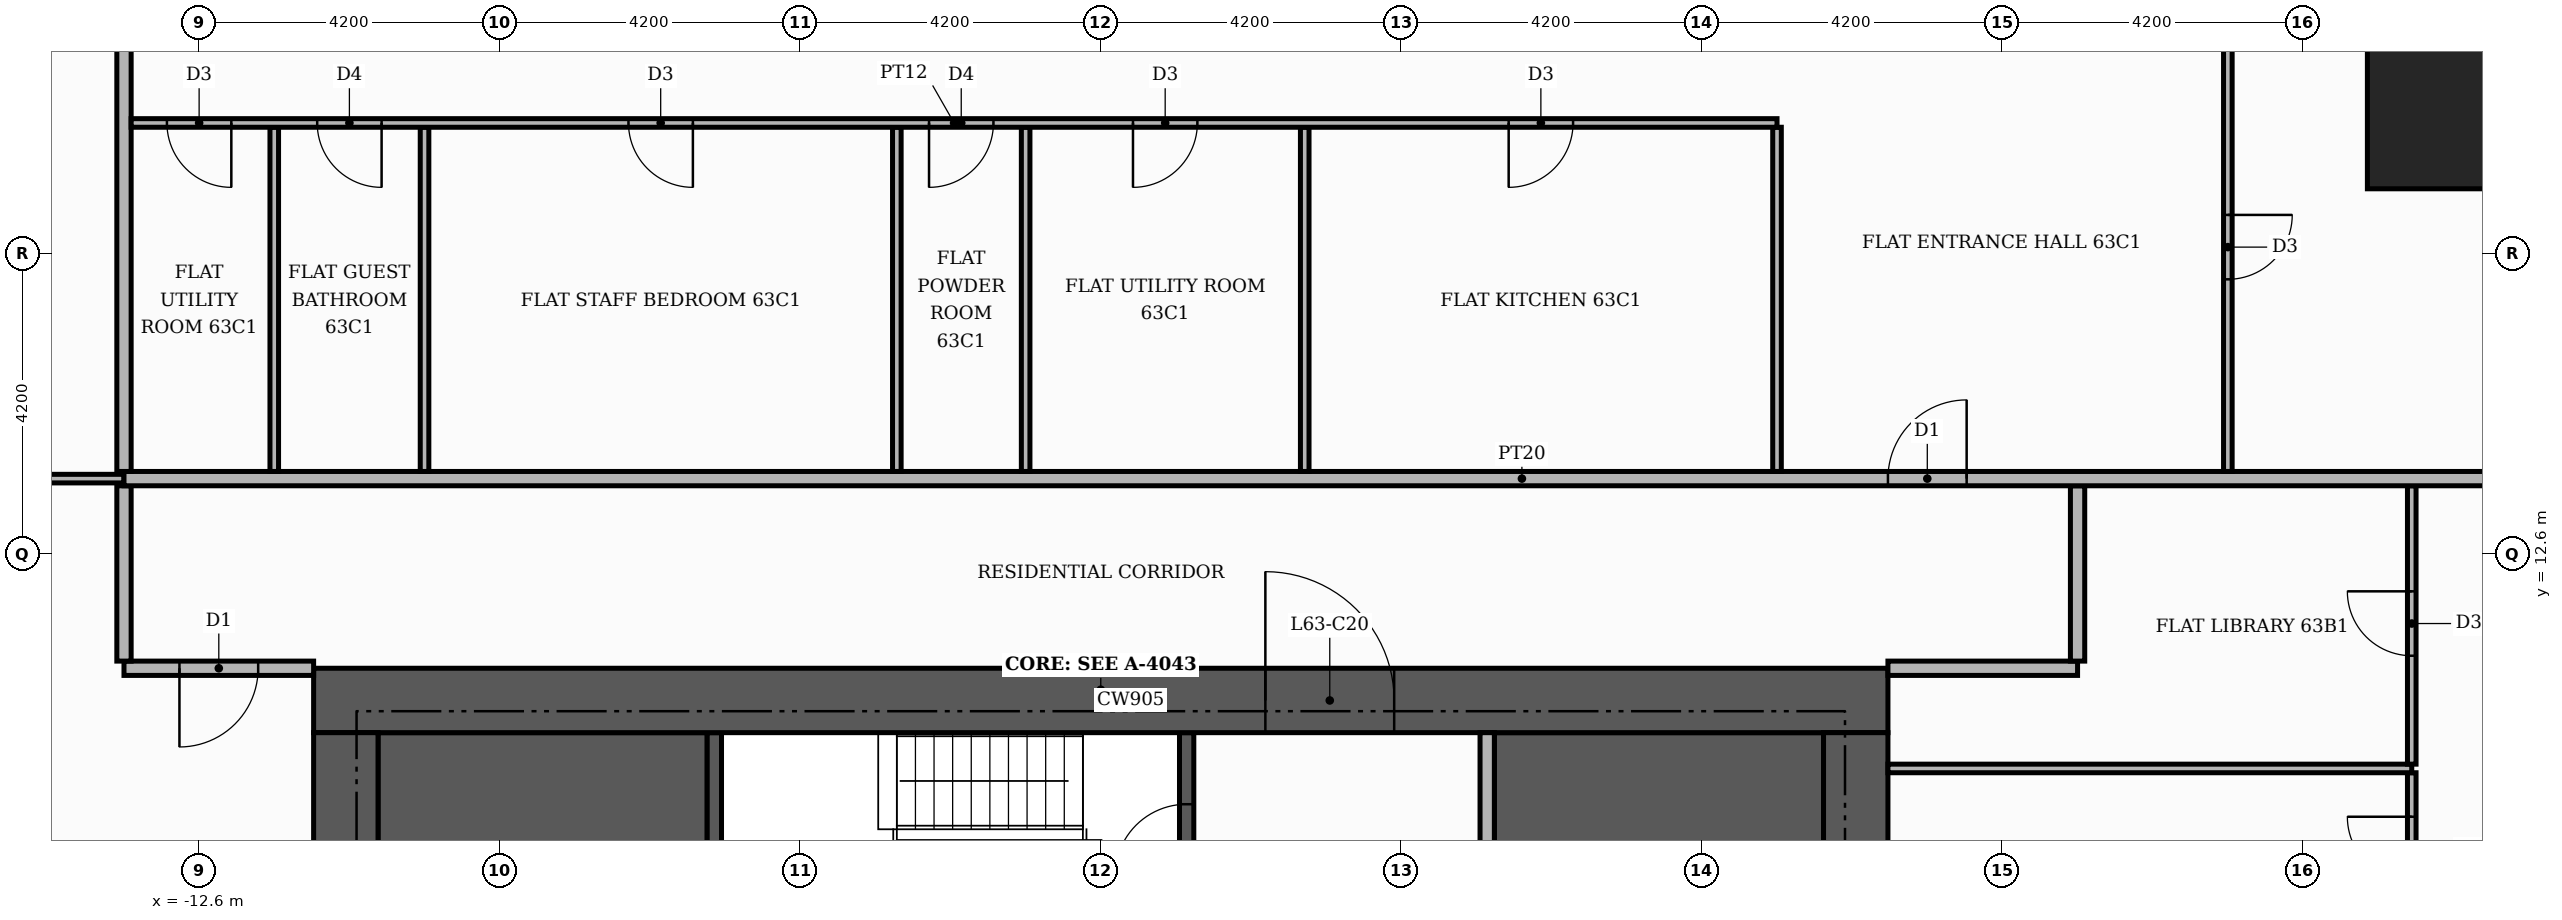
"""IFC4 building model, lengths in metres.
Left out: names, types, materials, properties, quantities, classifications, styles, units other than length and angle.
Written with IfcOpenShell. Run it as: python <this file> out.ifc"""

import sys

from ifc_helpers import new_model, si_unit, direction, frame, frame_2d, origin, origin_2d, place, context, subcontext, project, spatial, rectangle, extrude, element, fill, save


model = new_model("IFC4")
c1 = context("Model", 3, precision=1e-05, world=origin(), true_north=direction((0.0, 1.0)))
c2 = subcontext(c1, "Body", "Model", "MODEL_VIEW")
j1 = project(units=[si_unit("LENGTHUNIT", "METRE"), si_unit("PLANEANGLEUNIT", "RADIAN")], contexts=[c1])
p1 = place(None, origin())
s1 = spatial("IfcSite", under=j1, at=p1, CompositionType="ELEMENT")
p2 = place(p1, origin())
s2 = spatial("IfcBuilding", under=s1, at=p2, CompositionType="ELEMENT")
p3 = place(p2, frame((0.0, 0.0, 264.0)))
s3 = spatial("IfcBuildingStorey", under=s2, at=p3, CompositionType="ELEMENT", Elevation=264.0)
for number, where, z_axis, x_axis in (
    (1, (-10.1, 9.15, 0.0), (0.0, 0.0, 1.0), (1.0, 0.0, 0.0)),
    (2, (5.5, 9.15, 0.0), (0.0, 0.0, 1.0), (1.0, 0.0, 0.0)),
):
    element("IfcWall", number, at=place(p3, frame(where, z_axis=z_axis, x_axis=x_axis)), inside=s3, PredefinedType="SHEAR", context=c2, shape_type="SweptSolid", body=[
        extrude(rectangle(XDim=4.6, YDim=1.9, at=frame_2d((2.3, 0.0))), origin(), (0.0, 0.0, 1.0), 3.48),
    ])
p4 = place(p3, frame((-5.4, 7.25, 0.0), z_axis=(0.0, 0.0, 1.0), x_axis=(0.0, 1.0, 0.0)))
e3 = element("IfcWall", 3, at=p4, inside=s3, PredefinedType="SHEAR", context=c2, shape_type="SweptSolid", body=[
    extrude(rectangle(XDim=2.85, YDim=0.2, at=frame_2d((1.425, 0.0))), origin(), (0.0, 0.0, 1.0), 3.48),
])
p5 = place(p3, frame((1.2, 7.25, 0.0), z_axis=(0.0, 0.0, 1.0), x_axis=(0.0, 1.0, 0.0)))
e4 = element("IfcWall", 4, at=p5, inside=s3, PredefinedType="SHEAR", context=c2, shape_type="SweptSolid", body=[
    extrude(rectangle(XDim=2.85, YDim=0.2, at=frame_2d((1.425, 0.0))), origin(), (0.0, 0.0, 1.0), 3.48),
])
p6 = place(p5, frame((0.85, 0.0, 0.0)))
e5 = element("IfcOpeningElement", 5, at=p6, cuts=e4, PredefinedType="OPENING", context=c2, shape_type="SweptSolid", body=[
    extrude(rectangle(XDim=1.0, YDim=2.1, at=frame_2d((0.5, 1.05))), frame((0.0, 0.11, 0.0), z_axis=(0.0, -1.0, 0.0), x_axis=(1.0, 0.0, 0.0)), (0.0, 0.0, 1.0), 0.22),
])
p7 = place(p3, frame((-11.0, 10.55, 0.0), z_axis=(0.0, 0.0, 1.0), x_axis=(1.0, 0.0, 0.0)))
e6 = element("IfcWall", 6, at=p7, inside=s3, PredefinedType="SHEAR", context=c2, shape_type="SweptSolid", body=[
    extrude(rectangle(XDim=22.0, YDim=0.9, at=frame_2d((11.0, 0.0))), origin(), (0.0, 0.0, 1.0), 3.48),
])
p8 = place(p7, frame((13.3, 0.0, 0.0)))
e7 = element("IfcOpeningElement", 7, at=p8, cuts=e6, PredefinedType="OPENING", context=c2, shape_type="SweptSolid", body=[
    extrude(rectangle(XDim=1.8, YDim=2.2, at=frame_2d((0.9, 1.1))), frame((0.0, 0.46, 0.0), z_axis=(0.0, -1.0, 0.0), x_axis=(1.0, 0.0, 0.0)), (0.0, 0.0, 1.0), 0.92),
])
for number, where, z_axis, x_axis in (
    (8, (-10.55, -10.1, 0.0), (0.0, 0.0, 1.0), (0.0, 1.0, 0.0)),
    (9, (10.55, -10.1, 0.0), (0.0, 0.0, 1.0), (0.0, 1.0, 0.0)),
):
    element("IfcWall", number, at=place(p3, frame(where, z_axis=z_axis, x_axis=x_axis)), inside=s3, PredefinedType="SHEAR", context=c2, shape_type="SweptSolid", body=[
        extrude(rectangle(XDim=20.2, YDim=0.9, at=frame_2d((10.1, 0.0))), origin(), (0.0, 0.0, 1.0), 3.48),
    ])
p9 = place(p3, frame((18.8, 18.8, 0.0), z_axis=(0.0, 0.0, 1.0), x_axis=(1.0, 0.0, 0.0)))
e10 = element("IfcColumn", 10, at=p9, inside=s3, PredefinedType="COLUMN", context=c2, shape_type="SweptSolid", body=[
    extrude(rectangle(XDim=2.2, YDim=2.2, at=origin_2d()), origin(), (0.0, 0.0, 1.0), 3.9),
])
p10 = place(p3, frame((5.4, 5.5, 0.0), z_axis=(0.0, 0.0, 1.0), x_axis=(0.0, 1.0, 0.0)))
e11 = element("IfcWall", 11, at=p10, inside=s3, PredefinedType="PARTITIONING", context=c2, shape_type="SweptSolid", body=[
    extrude(rectangle(XDim=4.6, YDim=0.2, at=frame_2d((2.3, 0.0))), origin(), (0.0, 0.0, 1.0), 3.48),
])
p11 = place(p10, frame((0.25, 0.0, 0.0)))
e12 = element("IfcOpeningElement", 12, at=p11, cuts=e11, PredefinedType="OPENING", context=c2, shape_type="SweptSolid", body=[
    extrude(rectangle(XDim=1.0, YDim=2.1, at=frame_2d((0.5, 1.05))), frame((0.0, 0.11, 0.0), z_axis=(0.0, -1.0, 0.0), x_axis=(1.0, 0.0, 0.0)), (0.0, 0.0, 1.0), 0.22),
])
p12 = place(p3, frame((18.32, 7.41, 0.0), z_axis=(0.0, 0.0, 1.0), x_axis=(0.0, 1.0, 0.0)))
e13 = element("IfcWall", 13, at=p12, inside=s3, PredefinedType="PARTITIONING", context=c2, shape_type="SweptSolid", body=[
    extrude(rectangle(XDim=2.13, YDim=0.12, at=frame_2d((1.065, 0.0))), origin(), (0.0, 0.0, 1.0), 3.48),
])
p13 = place(p12, frame((0.615, 0.0, 0.0)))
e14 = element("IfcOpeningElement", 14, at=p13, cuts=e13, PredefinedType="OPENING", context=c2, shape_type="SweptSolid", body=[
    extrude(rectangle(XDim=0.9, YDim=2.1, at=frame_2d((0.45, 1.05))), frame((0.0, 0.07, 0.0), z_axis=(0.0, -1.0, 0.0), x_axis=(1.0, 0.0, 0.0)), (0.0, 0.0, 1.0), 0.14),
])
p14 = place(p3, frame((11.0, 9.6, 0.0), z_axis=(0.0, 0.0, 1.0), x_axis=(1.0, 0.0, 0.0)))
e15 = element("IfcWall", 15, at=p14, inside=s3, PredefinedType="PARTITIONING", context=c2, shape_type="SweptSolid", body=[
    extrude(rectangle(XDim=7.32, YDim=0.12, at=frame_2d((3.66, 0.0))), origin(), (0.0, 0.0, 1.0), 3.48),
])
p15 = place(p3, frame((18.32, 9.66, 0.0), z_axis=(0.0, 0.0, 1.0), x_axis=(0.0, 1.0, 0.0)))
e16 = element("IfcWall", 16, at=p15, inside=s3, PredefinedType="PARTITIONING", context=c2, shape_type="SweptSolid", body=[
    extrude(rectangle(XDim=3.89, YDim=0.12, at=frame_2d((1.945, 0.0))), origin(), (0.0, 0.0, 1.0), 3.48),
])
p16 = place(p15, frame((1.515, 0.0, 0.0)))
e17 = element("IfcOpeningElement", 17, at=p16, cuts=e16, PredefinedType="OPENING", context=c2, shape_type="SweptSolid", body=[
    extrude(rectangle(XDim=0.9, YDim=2.1, at=frame_2d((0.45, 1.05))), frame((0.0, 0.07, 0.0), z_axis=(0.0, -1.0, 0.0), x_axis=(1.0, 0.0, 0.0)), (0.0, 0.0, 1.0), 0.14),
])
p17 = place(p3, frame((-13.65, 11.0, 0.0), z_axis=(0.0, 0.0, 1.0), x_axis=(1.0, 0.0, 0.0)))
e18 = element("IfcWall", 18, at=p17, inside=s3, PredefinedType="PARTITIONING", context=c2, shape_type="SweptSolid", body=[
    extrude(rectangle(XDim=2.65, YDim=0.2, at=frame_2d((1.325, 0.0))), origin(), (0.0, 0.0, 1.0), 3.48),
])
p18 = place(p17, frame((0.775, 0.0, 0.0)))
e19 = element("IfcOpeningElement", 19, at=p18, cuts=e18, PredefinedType="OPENING", context=c2, shape_type="SweptSolid", body=[
    extrude(rectangle(XDim=1.1, YDim=2.4, at=frame_2d((0.55, 1.2))), frame((0.0, 0.11, 0.0), z_axis=(0.0, -1.0, 0.0), x_axis=(1.0, 0.0, 0.0)), (0.0, 0.0, 1.0), 0.22),
])
p19 = place(p3, frame((11.0, 11.0, 0.0), z_axis=(0.0, 0.0, 1.0), x_axis=(1.0, 0.0, 0.0)))
e20 = element("IfcWall", 20, at=p19, inside=s3, PredefinedType="PARTITIONING", context=c2, shape_type="SweptSolid", body=[
    extrude(rectangle(XDim=2.65, YDim=0.2, at=frame_2d((1.325, 0.0))), origin(), (0.0, 0.0, 1.0), 3.48),
])
for number, where, z_axis, x_axis in (
    (21, (-13.65, 11.1, 0.0), (0.0, 0.0, 1.0), (0.0, 1.0, 0.0)),
    (22, (13.65, 11.1, 0.0), (0.0, 0.0, 1.0), (0.0, 1.0, 0.0)),
):
    element("IfcWall", number, at=place(p3, frame(where, z_axis=z_axis, x_axis=x_axis)), inside=s3, PredefinedType="PARTITIONING", context=c2, shape_type="SweptSolid", body=[
        extrude(rectangle(XDim=2.45, YDim=0.2, at=frame_2d((1.225, 0.0))), origin(), (0.0, 0.0, 1.0), 3.48),
    ])
p20 = place(p3, frame((-20.42, 13.65, 0.0), z_axis=(0.0, 0.0, 1.0), x_axis=(1.0, 0.0, 0.0)))
e23 = element("IfcWall", 23, at=p20, inside=s3, PredefinedType="PARTITIONING", context=c2, shape_type="SweptSolid", body=[
    extrude(rectangle(XDim=6.77, YDim=0.12, at=frame_2d((3.385, 0.0))), origin(), (0.0, 0.0, 1.0), 3.48),
])
p21 = place(p20, frame((2.885, 0.0, 0.0)))
e24 = element("IfcOpeningElement", 24, at=p21, cuts=e23, PredefinedType="OPENING", context=c2, shape_type="SweptSolid", body=[
    extrude(rectangle(XDim=1.0, YDim=2.1, at=frame_2d((0.5, 1.05))), frame((0.0, 0.07, 0.0), z_axis=(0.0, -1.0, 0.0), x_axis=(1.0, 0.0, 0.0)), (0.0, 0.0, 1.0), 0.14),
])
p22 = place(p3, frame((-13.65, 13.65, 0.0), z_axis=(0.0, 0.0, 1.0), x_axis=(1.0, 0.0, 0.0)))
e25 = element("IfcWall", 25, at=p22, inside=s3, PredefinedType="PARTITIONING", context=c2, shape_type="SweptSolid", body=[
    extrude(rectangle(XDim=39.07, YDim=0.2, at=frame_2d((19.535, 0.0))), origin(), (0.0, 0.0, 1.0), 3.48),
])
p23 = place(p22, frame((24.65, 0.0, 0.0)))
e26 = element("IfcOpeningElement", 26, at=p23, cuts=e25, PredefinedType="OPENING", context=c2, shape_type="SweptSolid", body=[
    extrude(rectangle(XDim=1.1, YDim=2.4, at=frame_2d((0.55, 1.2))), frame((0.0, 0.11, 0.0), z_axis=(0.0, -1.0, 0.0), x_axis=(1.0, 0.0, 0.0)), (0.0, 0.0, 1.0), 0.22),
])
p24 = place(p3, frame((-13.65, 13.75, 0.0), z_axis=(0.0, 0.0, 1.0), x_axis=(0.0, 1.0, 0.0)))
e27 = element("IfcWall", 27, at=p24, inside=s3, PredefinedType="PARTITIONING", context=c2, shape_type="SweptSolid", body=[
    extrude(rectangle(XDim=11.67, YDim=0.2, at=frame_2d((5.835, 0.0))), origin(), (0.0, 0.0, 1.0), 3.48),
])
for number, where, z_axis, x_axis in (
    (28, (-11.55, 13.75, 0.0), (0.0, 0.0, 1.0), (0.0, 1.0, 0.0)),
    (29, (-9.45, 13.75, 0.0), (0.0, 0.0, 1.0), (0.0, 1.0, 0.0)),
    (30, (-2.85, 13.75, 0.0), (0.0, 0.0, 1.0), (0.0, 1.0, 0.0)),
    (31, (-1.05, 13.75, 0.0), (0.0, 0.0, 1.0), (0.0, 1.0, 0.0)),
    (32, (2.85, 13.75, 0.0), (0.0, 0.0, 1.0), (0.0, 1.0, 0.0)),
    (33, (9.45, 13.75, 0.0), (0.0, 0.0, 1.0), (0.0, 1.0, 0.0)),
):
    element("IfcWall", number, at=place(p3, frame(where, z_axis=z_axis, x_axis=x_axis)), inside=s3, PredefinedType="PARTITIONING", context=c2, shape_type="SweptSolid", body=[
        extrude(rectangle(XDim=4.81, YDim=0.12, at=frame_2d((2.405, 0.0))), origin(), (0.0, 0.0, 1.0), 3.48),
    ])
p25 = place(p3, frame((15.75, 13.75, 0.0), z_axis=(0.0, 0.0, 1.0), x_axis=(0.0, 1.0, 0.0)))
e34 = element("IfcWall", 34, at=p25, inside=s3, PredefinedType="PARTITIONING", context=c2, shape_type="SweptSolid", body=[
    extrude(rectangle(XDim=6.31, YDim=0.12, at=frame_2d((3.155, 0.0))), origin(), (0.0, 0.0, 1.0), 3.48),
])
p26 = place(p25, frame((2.685, 0.0, 0.0)))
e35 = element("IfcOpeningElement", 35, at=p26, cuts=e34, PredefinedType="OPENING", context=c2, shape_type="SweptSolid", body=[
    extrude(rectangle(XDim=0.9, YDim=2.1, at=frame_2d((0.45, 1.05))), frame((0.0, 0.07, 0.0), z_axis=(0.0, -1.0, 0.0), x_axis=(1.0, 0.0, 0.0)), (0.0, 0.0, 1.0), 0.14),
])
p27 = place(p3, frame((-13.55, 18.62, 0.0), z_axis=(0.0, 0.0, 1.0), x_axis=(1.0, 0.0, 0.0)))
e36 = element("IfcWall", 36, at=p27, inside=s3, PredefinedType="PARTITIONING", context=c2, shape_type="SweptSolid", body=[
    extrude(rectangle(XDim=23.0, YDim=0.12, at=frame_2d((11.5, 0.0))), origin(), (0.0, 0.0, 1.0), 3.48),
])
p28 = place(p27, frame((19.25, 0.0, 0.0)))
e37 = element("IfcOpeningElement", 37, at=p28, cuts=e36, PredefinedType="OPENING", context=c2, shape_type="SweptSolid", body=[
    extrude(rectangle(XDim=0.9, YDim=2.1, at=frame_2d((0.45, 1.05))), frame((0.0, 0.07, 0.0), z_axis=(0.0, -1.0, 0.0), x_axis=(1.0, 0.0, 0.0)), (0.0, 0.0, 1.0), 0.14),
])
p29 = place(p27, frame((14.0, 0.0, 0.0)))
e38 = element("IfcOpeningElement", 38, at=p29, cuts=e36, PredefinedType="OPENING", context=c2, shape_type="SweptSolid", body=[
    extrude(rectangle(XDim=0.9, YDim=2.1, at=frame_2d((0.45, 1.05))), frame((0.0, 0.07, 0.0), z_axis=(0.0, -1.0, 0.0), x_axis=(1.0, 0.0, 0.0)), (0.0, 0.0, 1.0), 0.14),
])
p30 = place(p27, frame((11.15, 0.0, 0.0)))
e39 = element("IfcOpeningElement", 39, at=p30, cuts=e36, PredefinedType="OPENING", context=c2, shape_type="SweptSolid", body=[
    extrude(rectangle(XDim=0.9, YDim=2.1, at=frame_2d((0.45, 1.05))), frame((0.0, 0.07, 0.0), z_axis=(0.0, -1.0, 0.0), x_axis=(1.0, 0.0, 0.0)), (0.0, 0.0, 1.0), 0.14),
])
p31 = place(p27, frame((6.95, 0.0, 0.0)))
e40 = element("IfcOpeningElement", 40, at=p31, cuts=e36, PredefinedType="OPENING", context=c2, shape_type="SweptSolid", body=[
    extrude(rectangle(XDim=0.9, YDim=2.1, at=frame_2d((0.45, 1.05))), frame((0.0, 0.07, 0.0), z_axis=(0.0, -1.0, 0.0), x_axis=(1.0, 0.0, 0.0)), (0.0, 0.0, 1.0), 0.14),
])
p32 = place(p27, frame((2.6, 0.0, 0.0)))
e41 = element("IfcOpeningElement", 41, at=p32, cuts=e36, PredefinedType="OPENING", context=c2, shape_type="SweptSolid", body=[
    extrude(rectangle(XDim=0.9, YDim=2.1, at=frame_2d((0.45, 1.05))), frame((0.0, 0.07, 0.0), z_axis=(0.0, -1.0, 0.0), x_axis=(1.0, 0.0, 0.0)), (0.0, 0.0, 1.0), 0.14),
])
p33 = place(p27, frame((0.5, 0.0, 0.0)))
e42 = element("IfcOpeningElement", 42, at=p33, cuts=e36, PredefinedType="OPENING", context=c2, shape_type="SweptSolid", body=[
    extrude(rectangle(XDim=0.9, YDim=2.1, at=frame_2d((0.45, 1.05))), frame((0.0, 0.07, 0.0), z_axis=(0.0, -1.0, 0.0), x_axis=(1.0, 0.0, 0.0)), (0.0, 0.0, 1.0), 0.14),
])
p34 = place(p6, origin())
e43 = element("IfcDoor", 43, at=p34, inside=s3, OperationType="SINGLE_SWING_LEFT", PredefinedType="DOOR", context=c2, shape_type="SweptSolid", body=[
    extrude(rectangle(XDim=1.0, YDim=2.1, at=frame_2d((0.5, 1.05))), frame((0.0, 0.025, 0.0), z_axis=(0.0, -1.0, 0.0), x_axis=(1.0, 0.0, 0.0)), (0.0, 0.0, 1.0), 0.05),
])
fill(e5, e43)
p35 = place(p8, origin())
e44 = element("IfcDoor", 44, at=p35, inside=s3, OperationType="DOUBLE_DOOR_SINGLE_SWING", PredefinedType="DOOR", context=c2, shape_type="SweptSolid", body=[
    extrude(rectangle(XDim=1.8, YDim=2.2, at=frame_2d((0.9, 1.1))), frame((0.0, 0.025, 0.0), z_axis=(0.0, -1.0, 0.0), x_axis=(1.0, 0.0, 0.0)), (0.0, 0.0, 1.0), 0.05),
])
fill(e7, e44)
p36 = place(p13, origin())
e45 = element("IfcDoor", 45, at=p36, inside=s3, OperationType="SINGLE_SWING_RIGHT", PredefinedType="DOOR", context=c2, shape_type="SweptSolid", body=[
    extrude(rectangle(XDim=0.9, YDim=2.1, at=frame_2d((0.45, 1.05))), frame((0.0, 0.025, 0.0), z_axis=(0.0, -1.0, 0.0), x_axis=(1.0, 0.0, 0.0)), (0.0, 0.0, 1.0), 0.05),
])
fill(e14, e45)
p37 = place(p16, origin())
e46 = element("IfcDoor", 46, at=p37, inside=s3, OperationType="SINGLE_SWING_RIGHT", PredefinedType="DOOR", context=c2, shape_type="SweptSolid", body=[
    extrude(rectangle(XDim=0.9, YDim=2.1, at=frame_2d((0.45, 1.05))), frame((0.0, 0.025, 0.0), z_axis=(0.0, -1.0, 0.0), x_axis=(1.0, 0.0, 0.0)), (0.0, 0.0, 1.0), 0.05),
])
fill(e17, e46)
p38 = place(p23, origin())
e47 = element("IfcDoor", 47, at=p38, inside=s3, OperationType="SINGLE_SWING_RIGHT", PredefinedType="DOOR", context=c2, shape_type="SweptSolid", body=[
    extrude(rectangle(XDim=1.1, YDim=2.4, at=frame_2d((0.55, 1.2))), frame((0.0, 0.025, 0.0), z_axis=(0.0, -1.0, 0.0), x_axis=(1.0, 0.0, 0.0)), (0.0, 0.0, 1.0), 0.05),
])
fill(e26, e47)
p39 = place(p26, frame((0.9, 0.0, 0.0), z_axis=(0.0, 0.0, 1.0), x_axis=(-1.0, 0.0, 0.0)))
e48 = element("IfcDoor", 48, at=p39, inside=s3, OperationType="SINGLE_SWING_RIGHT", PredefinedType="DOOR", context=c2, shape_type="SweptSolid", body=[
    extrude(rectangle(XDim=0.9, YDim=2.1, at=frame_2d((0.45, 1.05))), frame((0.0, 0.025, 0.0), z_axis=(0.0, -1.0, 0.0), x_axis=(1.0, 0.0, 0.0)), (0.0, 0.0, 1.0), 0.05),
])
fill(e35, e48)
p40 = place(p28, frame((0.9, 0.0, 0.0), z_axis=(0.0, 0.0, 1.0), x_axis=(-1.0, 0.0, 0.0)))
e49 = element("IfcDoor", 49, at=p40, inside=s3, OperationType="SINGLE_SWING_LEFT", PredefinedType="DOOR", context=c2, shape_type="SweptSolid", body=[
    extrude(rectangle(XDim=0.9, YDim=2.1, at=frame_2d((0.45, 1.05))), frame((0.0, 0.025, 0.0), z_axis=(0.0, -1.0, 0.0), x_axis=(1.0, 0.0, 0.0)), (0.0, 0.0, 1.0), 0.05),
])
fill(e37, e49)
p41 = place(p29, frame((0.9, 0.0, 0.0), z_axis=(0.0, 0.0, 1.0), x_axis=(-1.0, 0.0, 0.0)))
e50 = element("IfcDoor", 50, at=p41, inside=s3, OperationType="SINGLE_SWING_LEFT", PredefinedType="DOOR", context=c2, shape_type="SweptSolid", body=[
    extrude(rectangle(XDim=0.9, YDim=2.1, at=frame_2d((0.45, 1.05))), frame((0.0, 0.025, 0.0), z_axis=(0.0, -1.0, 0.0), x_axis=(1.0, 0.0, 0.0)), (0.0, 0.0, 1.0), 0.05),
])
fill(e38, e50)
p42 = place(p30, frame((0.9, 0.0, 0.0), z_axis=(0.0, 0.0, 1.0), x_axis=(-1.0, 0.0, 0.0)))
e51 = element("IfcDoor", 51, at=p42, inside=s3, OperationType="SINGLE_SWING_LEFT", PredefinedType="DOOR", context=c2, shape_type="SweptSolid", body=[
    extrude(rectangle(XDim=0.9, YDim=2.1, at=frame_2d((0.45, 1.05))), frame((0.0, 0.025, 0.0), z_axis=(0.0, -1.0, 0.0), x_axis=(1.0, 0.0, 0.0)), (0.0, 0.0, 1.0), 0.05),
])
fill(e39, e51)
p43 = place(p31, frame((0.9, 0.0, 0.0), z_axis=(0.0, 0.0, 1.0), x_axis=(-1.0, 0.0, 0.0)))
e52 = element("IfcDoor", 52, at=p43, inside=s3, OperationType="SINGLE_SWING_RIGHT", PredefinedType="DOOR", context=c2, shape_type="SweptSolid", body=[
    extrude(rectangle(XDim=0.9, YDim=2.1, at=frame_2d((0.45, 1.05))), frame((0.0, 0.025, 0.0), z_axis=(0.0, -1.0, 0.0), x_axis=(1.0, 0.0, 0.0)), (0.0, 0.0, 1.0), 0.05),
])
fill(e40, e52)
p44 = place(p32, frame((0.9, 0.0, 0.0), z_axis=(0.0, 0.0, 1.0), x_axis=(-1.0, 0.0, 0.0)))
e53 = element("IfcDoor", 53, at=p44, inside=s3, OperationType="SINGLE_SWING_RIGHT", PredefinedType="DOOR", context=c2, shape_type="SweptSolid", body=[
    extrude(rectangle(XDim=0.9, YDim=2.1, at=frame_2d((0.45, 1.05))), frame((0.0, 0.025, 0.0), z_axis=(0.0, -1.0, 0.0), x_axis=(1.0, 0.0, 0.0)), (0.0, 0.0, 1.0), 0.05),
])
fill(e41, e53)
p45 = place(p33, frame((0.9, 0.0, 0.0), z_axis=(0.0, 0.0, 1.0), x_axis=(-1.0, 0.0, 0.0)))
e54 = element("IfcDoor", 54, at=p45, inside=s3, OperationType="SINGLE_SWING_RIGHT", PredefinedType="DOOR", context=c2, shape_type="SweptSolid", body=[
    extrude(rectangle(XDim=0.9, YDim=2.1, at=frame_2d((0.45, 1.05))), frame((0.0, 0.025, 0.0), z_axis=(0.0, -1.0, 0.0), x_axis=(1.0, 0.0, 0.0)), (0.0, 0.0, 1.0), 0.05),
])
fill(e42, e54)
p46 = place(p18, frame((1.1, 0.0, 0.0), z_axis=(0.0, 0.0, 1.0), x_axis=(-1.0, 0.0, 0.0)))
e55 = element("IfcDoor", 55, at=p46, inside=s3, OperationType="SINGLE_SWING_LEFT", PredefinedType="DOOR", context=c2, shape_type="SweptSolid", body=[
    extrude(rectangle(XDim=1.1, YDim=2.4, at=frame_2d((0.55, 1.2))), frame((0.0, 0.025, 0.0), z_axis=(0.0, -1.0, 0.0), x_axis=(1.0, 0.0, 0.0)), (0.0, 0.0, 1.0), 0.05),
])
fill(e19, e55)
save(model, sys.argv[1])
